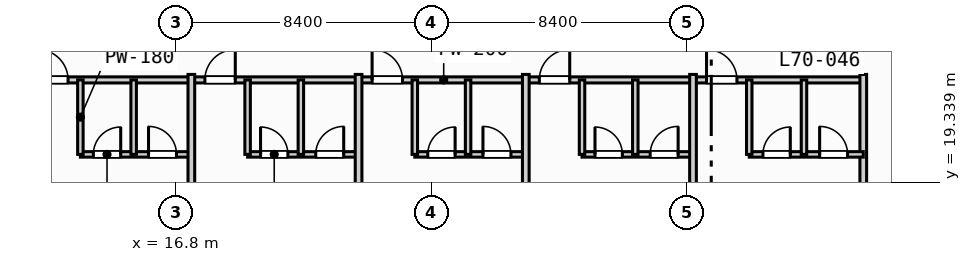
"""IFC4 building model, lengths in metres.
Left out: names, types, materials, properties, quantities, classifications, styles, units other than length and angle.
Written with IfcOpenShell. Run it as: python <this file> out.ifc"""

import sys

from ifc_helpers import new_model, si_unit, direction, frame, frame_2d, origin, place, context, subcontext, project, spatial, rectangle, extrude, element, fill, save


model = new_model("IFC4")
c1 = context("Model", 3, precision=1e-05, world=origin(), true_north=direction((0.0, 1.0)))
c2 = subcontext(c1, "Body", "Model", "MODEL_VIEW")
j1 = project(units=[si_unit("LENGTHUNIT", "METRE"), si_unit("PLANEANGLEUNIT", "RADIAN")], contexts=[c1])
p1 = place(None, origin())
s1 = spatial("IfcSite", under=j1, at=p1, CompositionType="ELEMENT")
p2 = place(p1, origin())
s2 = spatial("IfcBuilding", under=s1, at=p2, CompositionType="ELEMENT")
p3 = place(p2, frame((0.0, 0.0, 282.3)))
s3 = spatial("IfcBuildingStorey", under=s2, at=p3, CompositionType="ELEMENT", Elevation=282.3)
p4 = place(p3, frame((11.8, 22.7, 0.0), z_axis=(0.0, 0.0, 1.0), x_axis=(1.0, 0.0, 0.0)))
e1 = element("IfcWall", 1, at=p4, inside=s3, PredefinedType="PARTITIONING", context=c2, shape_type="SweptSolid", body=[
    extrude(rectangle(XDim=27.6, YDim=0.2, at=frame_2d((13.8, 0.0))), origin(), (0.0, 0.0, 1.0), 3.47),
])
p5 = place(p4, frame((0.445, 0.0, 0.0)))
e2 = element("IfcOpeningElement", 2, at=p5, cuts=e1, PredefinedType="OPENING", context=c2, shape_type="SweptSolid", body=[
    extrude(rectangle(XDim=1.0, YDim=2.15, at=frame_2d((0.5, 1.075))), frame((0.0, 0.11, 0.0), z_axis=(0.0, -1.0, 0.0), x_axis=(1.0, 0.0, 0.0)), (0.0, 0.0, 1.0), 0.22),
])
p6 = place(p4, frame((5.945, 0.0, 0.0)))
e3 = element("IfcOpeningElement", 3, at=p6, cuts=e1, PredefinedType="OPENING", context=c2, shape_type="SweptSolid", body=[
    extrude(rectangle(XDim=1.0, YDim=2.15, at=frame_2d((0.5, 1.075))), frame((0.0, 0.11, 0.0), z_axis=(0.0, -1.0, 0.0), x_axis=(1.0, 0.0, 0.0)), (0.0, 0.0, 1.0), 0.22),
])
p7 = place(p4, frame((11.445, 0.0, 0.0)))
e4 = element("IfcOpeningElement", 4, at=p7, cuts=e1, PredefinedType="OPENING", context=c2, shape_type="SweptSolid", body=[
    extrude(rectangle(XDim=1.0, YDim=2.15, at=frame_2d((0.5, 1.075))), frame((0.0, 0.11, 0.0), z_axis=(0.0, -1.0, 0.0), x_axis=(1.0, 0.0, 0.0)), (0.0, 0.0, 1.0), 0.22),
])
p8 = place(p4, frame((16.945, 0.0, 0.0)))
e5 = element("IfcOpeningElement", 5, at=p8, cuts=e1, PredefinedType="OPENING", context=c2, shape_type="SweptSolid", body=[
    extrude(rectangle(XDim=1.0, YDim=2.15, at=frame_2d((0.5, 1.075))), frame((0.0, 0.11, 0.0), z_axis=(0.0, -1.0, 0.0), x_axis=(1.0, 0.0, 0.0)), (0.0, 0.0, 1.0), 0.22),
])
p9 = place(p4, frame((22.445, 0.0, 0.0)))
e6 = element("IfcOpeningElement", 6, at=p9, cuts=e1, PredefinedType="OPENING", context=c2, shape_type="SweptSolid", body=[
    extrude(rectangle(XDim=1.0, YDim=2.15, at=frame_2d((0.5, 1.075))), frame((0.0, 0.11, 0.0), z_axis=(0.0, -1.0, 0.0), x_axis=(1.0, 0.0, 0.0)), (0.0, 0.0, 1.0), 0.22),
])
p10 = place(p3, frame((13.65, 20.25, 0.0), z_axis=(0.0, 0.0, 1.0), x_axis=(1.0, 0.0, 0.0)))
e7 = element("IfcWall", 7, at=p10, inside=s3, PredefinedType="PLUMBINGWALL", context=c2, shape_type="SweptSolid", body=[
    extrude(rectangle(XDim=3.65, YDim=0.18, at=frame_2d((1.825, 0.0))), origin(), (0.0, 0.0, 1.0), 3.47),
])
p11 = place(p10, frame((0.426, 0.0, 0.0)))
e8 = element("IfcOpeningElement", 8, at=p11, cuts=e7, PredefinedType="OPENING", context=c2, shape_type="SweptSolid", body=[
    extrude(rectangle(XDim=0.9, YDim=2.1, at=frame_2d((0.45, 1.05))), frame((0.0, 0.1, 0.0), z_axis=(0.0, -1.0, 0.0), x_axis=(1.0, 0.0, 0.0)), (0.0, 0.0, 1.0), 0.2),
])
p12 = place(p10, frame((2.241, 0.0, 0.0)))
e9 = element("IfcOpeningElement", 9, at=p12, cuts=e7, PredefinedType="OPENING", context=c2, shape_type="SweptSolid", body=[
    extrude(rectangle(XDim=0.92, YDim=2.1, at=frame_2d((0.46, 1.05))), frame((0.0, 0.1, 0.0), z_axis=(0.0, -1.0, 0.0), x_axis=(1.0, 0.0, 0.0)), (0.0, 0.0, 1.0), 0.2),
])
for number, where, z_axis, x_axis in (
    (10, (13.65, 20.25, 0.0), (0.0, 0.0, 1.0), (0.0, 1.0, 0.0)),
    (11, (15.402, 20.25, 0.0), (0.0, 0.0, 1.0), (0.0, 1.0, 0.0)),
):
    element("IfcWall", number, at=place(p3, frame(where, z_axis=z_axis, x_axis=x_axis)), inside=s3, PredefinedType="PLUMBINGWALL", context=c2, shape_type="SweptSolid", body=[
        extrude(rectangle(XDim=2.45, YDim=0.18, at=frame_2d((1.225, 0.0))), origin(), (0.0, 0.0, 1.0), 3.47),
    ])
p13 = place(p3, frame((17.3, 8.6, 0.0), z_axis=(0.0, 0.0, 1.0), x_axis=(0.0, 1.0, 0.0)))
e12 = element("IfcWall", 12, at=p13, inside=s3, PredefinedType="PARTITIONING", context=c2, shape_type="SweptSolid", body=[
    extrude(rectangle(XDim=14.28, YDim=0.22, at=frame_2d((7.14, 0.0))), origin(), (0.0, 0.0, 1.0), 3.47),
])
p14 = place(p3, frame((19.15, 20.25, 0.0), z_axis=(0.0, 0.0, 1.0), x_axis=(1.0, 0.0, 0.0)))
e13 = element("IfcWall", 13, at=p14, inside=s3, PredefinedType="PLUMBINGWALL", context=c2, shape_type="SweptSolid", body=[
    extrude(rectangle(XDim=3.65, YDim=0.18, at=frame_2d((1.825, 0.0))), origin(), (0.0, 0.0, 1.0), 3.47),
])
p15 = place(p14, frame((0.426, 0.0, 0.0)))
e14 = element("IfcOpeningElement", 14, at=p15, cuts=e13, PredefinedType="OPENING", context=c2, shape_type="SweptSolid", body=[
    extrude(rectangle(XDim=0.9, YDim=2.1, at=frame_2d((0.45, 1.05))), frame((0.0, 0.1, 0.0), z_axis=(0.0, -1.0, 0.0), x_axis=(1.0, 0.0, 0.0)), (0.0, 0.0, 1.0), 0.2),
])
p16 = place(p14, frame((2.241, 0.0, 0.0)))
e15 = element("IfcOpeningElement", 15, at=p16, cuts=e13, PredefinedType="OPENING", context=c2, shape_type="SweptSolid", body=[
    extrude(rectangle(XDim=0.92, YDim=2.1, at=frame_2d((0.46, 1.05))), frame((0.0, 0.1, 0.0), z_axis=(0.0, -1.0, 0.0), x_axis=(1.0, 0.0, 0.0)), (0.0, 0.0, 1.0), 0.2),
])
for number, where, z_axis, x_axis in (
    (16, (19.15, 20.25, 0.0), (0.0, 0.0, 1.0), (0.0, 1.0, 0.0)),
    (17, (20.902, 20.25, 0.0), (0.0, 0.0, 1.0), (0.0, 1.0, 0.0)),
):
    element("IfcWall", number, at=place(p3, frame(where, z_axis=z_axis, x_axis=x_axis)), inside=s3, PredefinedType="PLUMBINGWALL", context=c2, shape_type="SweptSolid", body=[
        extrude(rectangle(XDim=2.45, YDim=0.18, at=frame_2d((1.225, 0.0))), origin(), (0.0, 0.0, 1.0), 3.47),
    ])
p17 = place(p3, frame((22.8, 8.6, 0.0), z_axis=(0.0, 0.0, 1.0), x_axis=(0.0, 1.0, 0.0)))
e18 = element("IfcWall", 18, at=p17, inside=s3, PredefinedType="PARTITIONING", context=c2, shape_type="SweptSolid", body=[
    extrude(rectangle(XDim=14.28, YDim=0.22, at=frame_2d((7.14, 0.0))), origin(), (0.0, 0.0, 1.0), 3.47),
])
p18 = place(p3, frame((24.65, 20.25, 0.0), z_axis=(0.0, 0.0, 1.0), x_axis=(1.0, 0.0, 0.0)))
e19 = element("IfcWall", 19, at=p18, inside=s3, PredefinedType="PLUMBINGWALL", context=c2, shape_type="SweptSolid", body=[
    extrude(rectangle(XDim=3.65, YDim=0.18, at=frame_2d((1.825, 0.0))), origin(), (0.0, 0.0, 1.0), 3.47),
])
p19 = place(p18, frame((0.426, 0.0, 0.0)))
e20 = element("IfcOpeningElement", 20, at=p19, cuts=e19, PredefinedType="OPENING", context=c2, shape_type="SweptSolid", body=[
    extrude(rectangle(XDim=0.9, YDim=2.1, at=frame_2d((0.45, 1.05))), frame((0.0, 0.1, 0.0), z_axis=(0.0, -1.0, 0.0), x_axis=(1.0, 0.0, 0.0)), (0.0, 0.0, 1.0), 0.2),
])
p20 = place(p18, frame((2.241, 0.0, 0.0)))
e21 = element("IfcOpeningElement", 21, at=p20, cuts=e19, PredefinedType="OPENING", context=c2, shape_type="SweptSolid", body=[
    extrude(rectangle(XDim=0.92, YDim=2.1, at=frame_2d((0.46, 1.05))), frame((0.0, 0.1, 0.0), z_axis=(0.0, -1.0, 0.0), x_axis=(1.0, 0.0, 0.0)), (0.0, 0.0, 1.0), 0.2),
])
for number, where, z_axis, x_axis in (
    (22, (24.65, 20.25, 0.0), (0.0, 0.0, 1.0), (0.0, 1.0, 0.0)),
    (23, (26.402, 20.25, 0.0), (0.0, 0.0, 1.0), (0.0, 1.0, 0.0)),
):
    element("IfcWall", number, at=place(p3, frame(where, z_axis=z_axis, x_axis=x_axis)), inside=s3, PredefinedType="PLUMBINGWALL", context=c2, shape_type="SweptSolid", body=[
        extrude(rectangle(XDim=2.45, YDim=0.18, at=frame_2d((1.225, 0.0))), origin(), (0.0, 0.0, 1.0), 3.47),
    ])
p21 = place(p3, frame((28.3, 8.6, 0.0), z_axis=(0.0, 0.0, 1.0), x_axis=(0.0, 1.0, 0.0)))
e24 = element("IfcWall", 24, at=p21, inside=s3, PredefinedType="PARTITIONING", context=c2, shape_type="SweptSolid", body=[
    extrude(rectangle(XDim=14.28, YDim=0.22, at=frame_2d((7.14, 0.0))), origin(), (0.0, 0.0, 1.0), 3.47),
])
p22 = place(p3, frame((30.15, 20.25, 0.0), z_axis=(0.0, 0.0, 1.0), x_axis=(1.0, 0.0, 0.0)))
e25 = element("IfcWall", 25, at=p22, inside=s3, PredefinedType="PLUMBINGWALL", context=c2, shape_type="SweptSolid", body=[
    extrude(rectangle(XDim=3.65, YDim=0.18, at=frame_2d((1.825, 0.0))), origin(), (0.0, 0.0, 1.0), 3.47),
])
p23 = place(p22, frame((0.426, 0.0, 0.0)))
e26 = element("IfcOpeningElement", 26, at=p23, cuts=e25, PredefinedType="OPENING", context=c2, shape_type="SweptSolid", body=[
    extrude(rectangle(XDim=0.9, YDim=2.1, at=frame_2d((0.45, 1.05))), frame((0.0, 0.1, 0.0), z_axis=(0.0, -1.0, 0.0), x_axis=(1.0, 0.0, 0.0)), (0.0, 0.0, 1.0), 0.2),
])
p24 = place(p22, frame((2.241, 0.0, 0.0)))
e27 = element("IfcOpeningElement", 27, at=p24, cuts=e25, PredefinedType="OPENING", context=c2, shape_type="SweptSolid", body=[
    extrude(rectangle(XDim=0.92, YDim=2.1, at=frame_2d((0.46, 1.05))), frame((0.0, 0.1, 0.0), z_axis=(0.0, -1.0, 0.0), x_axis=(1.0, 0.0, 0.0)), (0.0, 0.0, 1.0), 0.2),
])
for number, where, z_axis, x_axis in (
    (28, (30.15, 20.25, 0.0), (0.0, 0.0, 1.0), (0.0, 1.0, 0.0)),
    (29, (31.902, 20.25, 0.0), (0.0, 0.0, 1.0), (0.0, 1.0, 0.0)),
):
    element("IfcWall", number, at=place(p3, frame(where, z_axis=z_axis, x_axis=x_axis)), inside=s3, PredefinedType="PLUMBINGWALL", context=c2, shape_type="SweptSolid", body=[
        extrude(rectangle(XDim=2.45, YDim=0.18, at=frame_2d((1.225, 0.0))), origin(), (0.0, 0.0, 1.0), 3.47),
    ])
p25 = place(p3, frame((33.8, 8.6, 0.0), z_axis=(0.0, 0.0, 1.0), x_axis=(0.0, 1.0, 0.0)))
e30 = element("IfcWall", 30, at=p25, inside=s3, PredefinedType="PARTITIONING", context=c2, shape_type="SweptSolid", body=[
    extrude(rectangle(XDim=14.28, YDim=0.22, at=frame_2d((7.14, 0.0))), origin(), (0.0, 0.0, 1.0), 2.87),
])
p26 = place(p3, frame((39.4, 8.6, 0.0), z_axis=(0.0, 0.0, 1.0), x_axis=(0.0, 1.0, 0.0)))
e31 = element("IfcWall", 31, at=p26, inside=s3, PredefinedType="PARTITIONING", context=c2, shape_type="SweptSolid", body=[
    extrude(rectangle(XDim=14.28, YDim=0.22, at=frame_2d((7.14, 0.0))), origin(), (0.0, 0.0, 1.0), 3.47),
])
p27 = place(p3, frame((35.65, 20.25, 0.0), z_axis=(0.0, 0.0, 1.0), x_axis=(1.0, 0.0, 0.0)))
e32 = element("IfcWall", 32, at=p27, inside=s3, PredefinedType="PLUMBINGWALL", context=c2, shape_type="SweptSolid", body=[
    extrude(rectangle(XDim=3.75, YDim=0.18, at=frame_2d((1.875, 0.0))), origin(), (0.0, 0.0, 1.0), 3.47),
])
p28 = place(p27, frame((0.45, 0.0, 0.0)))
e33 = element("IfcOpeningElement", 33, at=p28, cuts=e32, PredefinedType="OPENING", context=c2, shape_type="SweptSolid", body=[
    extrude(rectangle(XDim=0.9, YDim=2.1, at=frame_2d((0.45, 1.05))), frame((0.0, 0.1, 0.0), z_axis=(0.0, -1.0, 0.0), x_axis=(1.0, 0.0, 0.0)), (0.0, 0.0, 1.0), 0.2),
])
p29 = place(p27, frame((2.315, 0.0, 0.0)))
e34 = element("IfcOpeningElement", 34, at=p29, cuts=e32, PredefinedType="OPENING", context=c2, shape_type="SweptSolid", body=[
    extrude(rectangle(XDim=0.92, YDim=2.1, at=frame_2d((0.46, 1.05))), frame((0.0, 0.1, 0.0), z_axis=(0.0, -1.0, 0.0), x_axis=(1.0, 0.0, 0.0)), (0.0, 0.0, 1.0), 0.2),
])
for number, where, z_axis, x_axis in (
    (35, (35.65, 20.25, 0.0), (0.0, 0.0, 1.0), (0.0, 1.0, 0.0)),
    (36, (37.45, 20.25, 0.0), (0.0, 0.0, 1.0), (0.0, 1.0, 0.0)),
):
    element("IfcWall", number, at=place(p3, frame(where, z_axis=z_axis, x_axis=x_axis)), inside=s3, PredefinedType="PLUMBINGWALL", context=c2, shape_type="SweptSolid", body=[
        extrude(rectangle(XDim=2.45, YDim=0.18, at=frame_2d((1.225, 0.0))), origin(), (0.0, 0.0, 1.0), 3.47),
    ])
p30 = place(p5, origin())
e37 = element("IfcDoor", 37, at=p30, inside=s3, OperationType="SINGLE_SWING_LEFT", PredefinedType="DOOR", context=c2, shape_type="SweptSolid", body=[
    extrude(rectangle(XDim=1.0, YDim=2.15, at=frame_2d((0.5, 1.075))), frame((0.0, 0.025, 0.0), z_axis=(0.0, -1.0, 0.0), x_axis=(1.0, 0.0, 0.0)), (0.0, 0.0, 1.0), 0.05),
])
fill(e2, e37)
p31 = place(p6, origin())
e38 = element("IfcDoor", 38, at=p31, inside=s3, OperationType="SINGLE_SWING_RIGHT", PredefinedType="DOOR", context=c2, shape_type="SweptSolid", body=[
    extrude(rectangle(XDim=1.0, YDim=2.15, at=frame_2d((0.5, 1.075))), frame((0.0, 0.025, 0.0), z_axis=(0.0, -1.0, 0.0), x_axis=(1.0, 0.0, 0.0)), (0.0, 0.0, 1.0), 0.05),
])
fill(e3, e38)
p32 = place(p7, origin())
e39 = element("IfcDoor", 39, at=p32, inside=s3, OperationType="SINGLE_SWING_LEFT", PredefinedType="DOOR", context=c2, shape_type="SweptSolid", body=[
    extrude(rectangle(XDim=1.0, YDim=2.15, at=frame_2d((0.5, 1.075))), frame((0.0, 0.025, 0.0), z_axis=(0.0, -1.0, 0.0), x_axis=(1.0, 0.0, 0.0)), (0.0, 0.0, 1.0), 0.05),
])
fill(e4, e39)
p33 = place(p8, origin())
e40 = element("IfcDoor", 40, at=p33, inside=s3, OperationType="SINGLE_SWING_RIGHT", PredefinedType="DOOR", context=c2, shape_type="SweptSolid", body=[
    extrude(rectangle(XDim=1.0, YDim=2.15, at=frame_2d((0.5, 1.075))), frame((0.0, 0.025, 0.0), z_axis=(0.0, -1.0, 0.0), x_axis=(1.0, 0.0, 0.0)), (0.0, 0.0, 1.0), 0.05),
])
fill(e5, e40)
p34 = place(p9, origin())
e41 = element("IfcDoor", 41, at=p34, inside=s3, OperationType="SINGLE_SWING_LEFT", PredefinedType="DOOR", context=c2, shape_type="SweptSolid", body=[
    extrude(rectangle(XDim=1.0, YDim=2.15, at=frame_2d((0.5, 1.075))), frame((0.0, 0.025, 0.0), z_axis=(0.0, -1.0, 0.0), x_axis=(1.0, 0.0, 0.0)), (0.0, 0.0, 1.0), 0.05),
])
fill(e6, e41)
p35 = place(p11, origin())
e42 = element("IfcDoor", 42, at=p35, inside=s3, OperationType="SINGLE_SWING_RIGHT", PredefinedType="DOOR", context=c2, shape_type="SweptSolid", body=[
    extrude(rectangle(XDim=0.9, YDim=2.1, at=frame_2d((0.45, 1.05))), frame((0.0, 0.025, 0.0), z_axis=(0.0, -1.0, 0.0), x_axis=(1.0, 0.0, 0.0)), (0.0, 0.0, 1.0), 0.05),
])
fill(e8, e42)
p36 = place(p12, origin())
e43 = element("IfcDoor", 43, at=p36, inside=s3, OperationType="SINGLE_SWING_LEFT", PredefinedType="DOOR", context=c2, shape_type="SweptSolid", body=[
    extrude(rectangle(XDim=0.92, YDim=2.1, at=frame_2d((0.46, 1.05))), frame((0.0, 0.025, 0.0), z_axis=(0.0, -1.0, 0.0), x_axis=(1.0, 0.0, 0.0)), (0.0, 0.0, 1.0), 0.05),
])
fill(e9, e43)
p37 = place(p15, origin())
e44 = element("IfcDoor", 44, at=p37, inside=s3, OperationType="SINGLE_SWING_LEFT", PredefinedType="DOOR", context=c2, shape_type="SweptSolid", body=[
    extrude(rectangle(XDim=0.9, YDim=2.1, at=frame_2d((0.45, 1.05))), frame((0.0, 0.025, 0.0), z_axis=(0.0, -1.0, 0.0), x_axis=(1.0, 0.0, 0.0)), (0.0, 0.0, 1.0), 0.05),
])
fill(e14, e44)
p38 = place(p16, origin())
e45 = element("IfcDoor", 45, at=p38, inside=s3, OperationType="SINGLE_SWING_RIGHT", PredefinedType="DOOR", context=c2, shape_type="SweptSolid", body=[
    extrude(rectangle(XDim=0.92, YDim=2.1, at=frame_2d((0.46, 1.05))), frame((0.0, 0.025, 0.0), z_axis=(0.0, -1.0, 0.0), x_axis=(1.0, 0.0, 0.0)), (0.0, 0.0, 1.0), 0.05),
])
fill(e15, e45)
p39 = place(p19, origin())
e46 = element("IfcDoor", 46, at=p39, inside=s3, OperationType="SINGLE_SWING_RIGHT", PredefinedType="DOOR", context=c2, shape_type="SweptSolid", body=[
    extrude(rectangle(XDim=0.9, YDim=2.1, at=frame_2d((0.45, 1.05))), frame((0.0, 0.025, 0.0), z_axis=(0.0, -1.0, 0.0), x_axis=(1.0, 0.0, 0.0)), (0.0, 0.0, 1.0), 0.05),
])
fill(e20, e46)
p40 = place(p20, origin())
e47 = element("IfcDoor", 47, at=p40, inside=s3, OperationType="SINGLE_SWING_LEFT", PredefinedType="DOOR", context=c2, shape_type="SweptSolid", body=[
    extrude(rectangle(XDim=0.92, YDim=2.1, at=frame_2d((0.46, 1.05))), frame((0.0, 0.025, 0.0), z_axis=(0.0, -1.0, 0.0), x_axis=(1.0, 0.0, 0.0)), (0.0, 0.0, 1.0), 0.05),
])
fill(e21, e47)
p41 = place(p23, origin())
e48 = element("IfcDoor", 48, at=p41, inside=s3, OperationType="SINGLE_SWING_LEFT", PredefinedType="DOOR", context=c2, shape_type="SweptSolid", body=[
    extrude(rectangle(XDim=0.9, YDim=2.1, at=frame_2d((0.45, 1.05))), frame((0.0, 0.025, 0.0), z_axis=(0.0, -1.0, 0.0), x_axis=(1.0, 0.0, 0.0)), (0.0, 0.0, 1.0), 0.05),
])
fill(e26, e48)
p42 = place(p24, origin())
e49 = element("IfcDoor", 49, at=p42, inside=s3, OperationType="SINGLE_SWING_RIGHT", PredefinedType="DOOR", context=c2, shape_type="SweptSolid", body=[
    extrude(rectangle(XDim=0.92, YDim=2.1, at=frame_2d((0.46, 1.05))), frame((0.0, 0.025, 0.0), z_axis=(0.0, -1.0, 0.0), x_axis=(1.0, 0.0, 0.0)), (0.0, 0.0, 1.0), 0.05),
])
fill(e27, e49)
p43 = place(p28, origin())
e50 = element("IfcDoor", 50, at=p43, inside=s3, OperationType="SINGLE_SWING_RIGHT", PredefinedType="DOOR", context=c2, shape_type="SweptSolid", body=[
    extrude(rectangle(XDim=0.9, YDim=2.1, at=frame_2d((0.45, 1.05))), frame((0.0, 0.025, 0.0), z_axis=(0.0, -1.0, 0.0), x_axis=(1.0, 0.0, 0.0)), (0.0, 0.0, 1.0), 0.05),
])
fill(e33, e50)
p44 = place(p29, origin())
e51 = element("IfcDoor", 51, at=p44, inside=s3, OperationType="SINGLE_SWING_LEFT", PredefinedType="DOOR", context=c2, shape_type="SweptSolid", body=[
    extrude(rectangle(XDim=0.92, YDim=2.1, at=frame_2d((0.46, 1.05))), frame((0.0, 0.025, 0.0), z_axis=(0.0, -1.0, 0.0), x_axis=(1.0, 0.0, 0.0)), (0.0, 0.0, 1.0), 0.05),
])
fill(e34, e51)
save(model, sys.argv[1])
